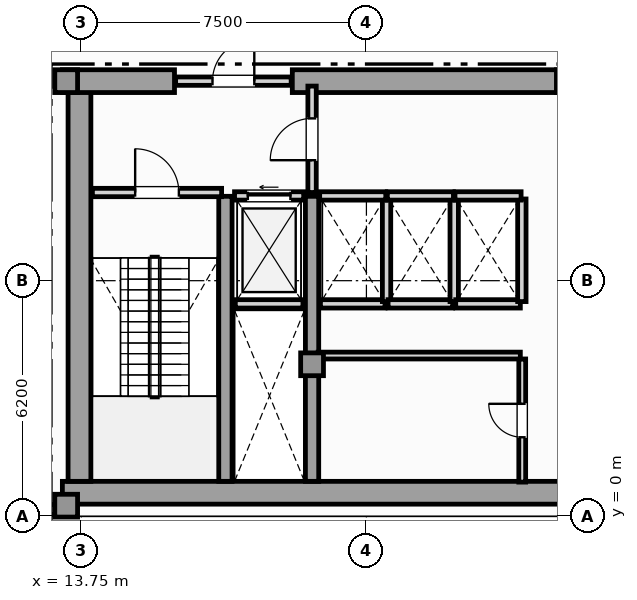
"""IFC4 building model, lengths in metres.
Left out: names, types, materials, properties, quantities, classifications, styles, units other than length and angle.
Written with IfcOpenShell. Run it as: python <this file> out.ifc"""

import sys

from ifc_helpers import new_model, si_unit, direction, frame, frame_2d, origin, origin_2d, place, context, subcontext, project, spatial, rectangle, extrude, element, fill, save


model = new_model("IFC4")
c1 = context("Model", 3, precision=1e-05, world=origin(), true_north=direction((0.0, 1.0)))
c2 = subcontext(c1, "Body", "Model", "MODEL_VIEW")
j1 = project(units=[si_unit("LENGTHUNIT", "METRE"), si_unit("PLANEANGLEUNIT", "RADIAN")], contexts=[c1])
p1 = place(None, origin())
s1 = spatial("IfcSite", under=j1, at=p1, CompositionType="ELEMENT")
p2 = place(p1, origin())
s2 = spatial("IfcBuilding", under=s1, at=p2, CompositionType="ELEMENT")
p3 = place(p2, frame((0.0, 0.0, 246.5)))
s3 = spatial("IfcBuildingStorey", under=s2, at=p3, CompositionType="ELEMENT", Elevation=246.5)
p4 = place(p3, frame((13.25, 0.62, 0.0), z_axis=(0.0, 0.0, 1.0), x_axis=(1.0, 0.0, 0.0)))
e1 = element("IfcWall", 1, at=p4, inside=s3, PredefinedType="SHEAR", context=c2, shape_type="SweptSolid", body=[
    extrude(rectangle(XDim=31.0, YDim=0.6, at=frame_2d((15.5, 0.0))), origin(), (0.0, 0.0, 1.0), 4.92),
])
p5 = place(p3, frame((13.7, 0.92, 0.0), z_axis=(0.0, 0.0, 1.0), x_axis=(0.0, 1.0, 0.0)))
e2 = element("IfcWall", 2, at=p5, inside=s3, PredefinedType="SHEAR", context=c2, shape_type="SweptSolid", body=[
    extrude(rectangle(XDim=10.53, YDim=0.6, at=frame_2d((5.265, 0.0))), origin(), (0.0, 0.0, 1.0), 4.92),
])
p6 = place(p3, frame((13.25, 11.45, 0.0), z_axis=(0.0, 0.0, 1.0), x_axis=(1.0, 0.0, 0.0)))
e3 = element("IfcWall", 3, at=p6, inside=s3, PredefinedType="SHEAR", context=c2, shape_type="SweptSolid", body=[
    extrude(rectangle(XDim=2.95, YDim=0.6, at=frame_2d((1.475, 0.0))), origin(), (0.0, 0.0, 1.0), 4.92),
])
p7 = place(p3, frame((19.3, 11.45, 0.0), z_axis=(0.0, 0.0, 1.0), x_axis=(1.0, 0.0, 0.0)))
e4 = element("IfcWall", 4, at=p7, inside=s3, PredefinedType="SHEAR", context=c2, shape_type="SweptSolid", body=[
    extrude(rectangle(XDim=7.3, YDim=0.6, at=frame_2d((3.65, 0.0))), origin(), (0.0, 0.0, 1.0), 4.92),
])
for number, where, z_axis, x_axis in (
    (5, (17.54, 0.92, 0.0), (0.0, 0.0, 1.0), (0.0, 1.0, 0.0)),
    (6, (19.82, 0.92, 0.0), (0.0, 0.0, 1.0), (0.0, 1.0, 0.0)),
):
    element("IfcWall", number, at=place(p3, frame(where, z_axis=z_axis, x_axis=x_axis)), inside=s3, PredefinedType="SHEAR", context=c2, shape_type="SweptSolid", body=[
        extrude(rectangle(XDim=7.5, YDim=0.35, at=frame_2d((3.75, 0.0))), origin(), (0.0, 0.0, 1.0), 4.92),
    ])
for number, where, z_axis, x_axis in (
    (7, (13.35, 0.28, 0.0), (0.0, 0.0, 1.0), (1.0, 0.0, 0.0)),
    (8, (13.35, 11.45, 0.0), (0.0, 0.0, 1.0), (1.0, 0.0, 0.0)),
    (9, (19.82, 4.0, 0.0), (0.0, 0.0, 1.0), (1.0, 0.0, 0.0)),
    (10, (26.55, 11.45, 0.0), (0.0, 0.0, 1.0), (1.0, 0.0, 0.0)),
):
    element("IfcColumn", number, at=place(p3, frame(where, z_axis=z_axis, x_axis=x_axis)), inside=s3, PredefinedType="COLUMN", context=c2, shape_type="SweptSolid", body=[
        extrude(rectangle(XDim=0.6, YDim=0.6, at=origin_2d()), origin(), (0.0, 0.0, 1.0), 5.2),
    ])
p8 = place(p3, frame((11.024, 0.18, 0.0), z_axis=(0.0, 0.0, 1.0), x_axis=(1.0, 0.0, 0.0)))
e11 = element("IfcWall", 11, at=p8, inside=s3, PredefinedType="SOLIDWALL", context=c2, shape_type="SweptSolid", body=[
    extrude(rectangle(XDim=2.226, YDim=0.26, at=frame_2d((1.113, 0.0))), origin(), (0.0, 0.0, 1.0), 4.92),
])
p9 = place(p3, frame((17.8, 5.59, 0.0), z_axis=(0.0, 0.0, 1.0), x_axis=(1.0, 0.0, 0.0)))
e12 = element("IfcWall", 12, at=p9, inside=s3, PredefinedType="SOLIDWALL", context=c2, shape_type="SweptSolid", body=[
    extrude(rectangle(XDim=1.78, YDim=0.22, at=frame_2d((0.89, 0.0))), origin(), (0.0, 0.0, 1.0), 4.92),
])
p10 = place(p3, frame((17.78, 8.43, 0.0), z_axis=(0.0, 0.0, 1.0), x_axis=(1.0, 0.0, 0.0)))
e13 = element("IfcWall", 13, at=p10, inside=s3, PredefinedType="SOLIDWALL", context=c2, shape_type="SweptSolid", body=[
    extrude(rectangle(XDim=1.82, YDim=0.22, at=frame_2d((0.91, 0.0))), origin(), (0.0, 0.0, 1.0), 4.92),
])
p11 = place(p10, frame((0.35, 0.0, 0.0)))
e14 = element("IfcOpeningElement", 14, at=p11, cuts=e13, PredefinedType="OPENING", context=c2, shape_type="SweptSolid", body=[
    extrude(rectangle(XDim=1.12, YDim=2.25, at=frame_2d((0.56, 1.125))), frame((0.0, 0.12, 0.0), z_axis=(0.0, -1.0, 0.0), x_axis=(1.0, 0.0, 0.0)), (0.0, 0.0, 1.0), 0.24),
])
p12 = place(p3, frame((20.04, 5.59, 0.0), z_axis=(0.0, 0.0, 1.0), x_axis=(1.0, 0.0, 0.0)))
e15 = element("IfcWall", 15, at=p12, inside=s3, PredefinedType="SOLIDWALL", context=c2, shape_type="SweptSolid", body=[
    extrude(rectangle(XDim=1.7, YDim=0.22, at=frame_2d((0.85, 0.0))), origin(), (0.0, 0.0, 1.0), 4.92),
])
p13 = place(p3, frame((21.78, 5.65, 0.0), z_axis=(0.0, 0.0, 1.0), x_axis=(0.0, 1.0, 0.0)))
e16 = element("IfcWall", 16, at=p13, inside=s3, PredefinedType="SOLIDWALL", context=c2, shape_type="SweptSolid", body=[
    extrude(rectangle(XDim=2.7, YDim=0.22, at=frame_2d((1.35, 0.0))), origin(), (0.0, 0.0, 1.0), 4.92),
])
p14 = place(p3, frame((20.02, 8.43, 0.0), z_axis=(0.0, 0.0, 1.0), x_axis=(1.0, 0.0, 0.0)))
e17 = element("IfcWall", 17, at=p14, inside=s3, PredefinedType="SOLIDWALL", context=c2, shape_type="SweptSolid", body=[
    extrude(rectangle(XDim=1.74, YDim=0.22, at=frame_2d((0.87, 0.0))), origin(), (0.0, 0.0, 1.0), 4.92),
])
p15 = place(p3, frame((21.82, 5.59, 0.0), z_axis=(0.0, 0.0, 1.0), x_axis=(1.0, 0.0, 0.0)))
e18 = element("IfcWall", 18, at=p15, inside=s3, PredefinedType="SOLIDWALL", context=c2, shape_type="SweptSolid", body=[
    extrude(rectangle(XDim=1.7, YDim=0.22, at=frame_2d((0.85, 0.0))), origin(), (0.0, 0.0, 1.0), 4.92),
])
p16 = place(p3, frame((23.56, 5.65, 0.0), z_axis=(0.0, 0.0, 1.0), x_axis=(0.0, 1.0, 0.0)))
e19 = element("IfcWall", 19, at=p16, inside=s3, PredefinedType="SOLIDWALL", context=c2, shape_type="SweptSolid", body=[
    extrude(rectangle(XDim=2.7, YDim=0.22, at=frame_2d((1.35, 0.0))), origin(), (0.0, 0.0, 1.0), 4.92),
])
p17 = place(p3, frame((21.8, 8.43, 0.0), z_axis=(0.0, 0.0, 1.0), x_axis=(1.0, 0.0, 0.0)))
e20 = element("IfcWall", 20, at=p17, inside=s3, PredefinedType="SOLIDWALL", context=c2, shape_type="SweptSolid", body=[
    extrude(rectangle(XDim=1.74, YDim=0.22, at=frame_2d((0.87, 0.0))), origin(), (0.0, 0.0, 1.0), 4.92),
])
p18 = place(p3, frame((23.6, 5.59, 0.0), z_axis=(0.0, 0.0, 1.0), x_axis=(1.0, 0.0, 0.0)))
e21 = element("IfcWall", 21, at=p18, inside=s3, PredefinedType="SOLIDWALL", context=c2, shape_type="SweptSolid", body=[
    extrude(rectangle(XDim=1.7, YDim=0.22, at=frame_2d((0.85, 0.0))), origin(), (0.0, 0.0, 1.0), 4.92),
])
p19 = place(p3, frame((25.34, 5.65, 0.0), z_axis=(0.0, 0.0, 1.0), x_axis=(0.0, 1.0, 0.0)))
e22 = element("IfcWall", 22, at=p19, inside=s3, PredefinedType="SOLIDWALL", context=c2, shape_type="SweptSolid", body=[
    extrude(rectangle(XDim=2.7, YDim=0.22, at=frame_2d((1.35, 0.0))), origin(), (0.0, 0.0, 1.0), 4.92),
])
p20 = place(p3, frame((23.58, 8.43, 0.0), z_axis=(0.0, 0.0, 1.0), x_axis=(1.0, 0.0, 0.0)))
e23 = element("IfcWall", 23, at=p20, inside=s3, PredefinedType="SOLIDWALL", context=c2, shape_type="SweptSolid", body=[
    extrude(rectangle(XDim=1.74, YDim=0.22, at=frame_2d((0.87, 0.0))), origin(), (0.0, 0.0, 1.0), 4.92),
])
p21 = place(p3, frame((14.04, 8.52, 0.0), z_axis=(0.0, 0.0, 1.0), x_axis=(1.0, 0.0, 0.0)))
e24 = element("IfcWall", 24, at=p21, inside=s3, PredefinedType="SOLIDWALL", context=c2, shape_type="SweptSolid", body=[
    extrude(rectangle(XDim=3.4, YDim=0.22, at=frame_2d((1.7, 0.0))), origin(), (0.0, 0.0, 1.0), 4.92),
])
p22 = place(p21, frame((1.125, 0.0, 0.0)))
e25 = element("IfcOpeningElement", 25, at=p22, cuts=e24, PredefinedType="OPENING", context=c2, shape_type="SweptSolid", body=[
    extrude(rectangle(XDim=1.15, YDim=2.2, at=frame_2d((0.575, 1.1))), frame((0.0, 0.12, 0.0), z_axis=(0.0, -1.0, 0.0), x_axis=(1.0, 0.0, 0.0)), (0.0, 0.0, 1.0), 0.24),
])
p23 = place(p3, frame((19.82, 8.52, 0.0), z_axis=(0.0, 0.0, 1.0), x_axis=(0.0, 1.0, 0.0)))
e26 = element("IfcWall", 26, at=p23, inside=s3, PredefinedType="SOLIDWALL", context=c2, shape_type="SweptSolid", body=[
    extrude(rectangle(XDim=2.8, YDim=0.22, at=frame_2d((1.4, 0.0))), origin(), (0.0, 0.0, 1.0), 4.375),
])
p24 = place(p23, frame((0.85, 0.0, 0.0)))
e27 = element("IfcOpeningElement", 27, at=p24, cuts=e26, PredefinedType="OPENING", context=c2, shape_type="SweptSolid", body=[
    extrude(rectangle(XDim=1.1, YDim=2.2, at=frame_2d((0.55, 1.1))), frame((0.0, 0.12, 0.0), z_axis=(0.0, -1.0, 0.0), x_axis=(1.0, 0.0, 0.0)), (0.0, 0.0, 1.0), 0.24),
])
p25 = place(p3, frame((16.23, 11.45, 0.0), z_axis=(0.0, 0.0, 1.0), x_axis=(1.0, 0.0, 0.0)))
e28 = element("IfcWall", 28, at=p25, inside=s3, PredefinedType="SOLIDWALL", context=c2, shape_type="SweptSolid", body=[
    extrude(rectangle(XDim=3.04, YDim=0.22, at=frame_2d((1.52, 0.0))), origin(), (0.0, 0.0, 1.0), 4.92),
])
p26 = place(p25, frame((0.97, 0.0, 0.0)))
e29 = element("IfcOpeningElement", 29, at=p26, cuts=e28, PredefinedType="OPENING", context=c2, shape_type="SweptSolid", body=[
    extrude(rectangle(XDim=1.1, YDim=2.2, at=frame_2d((0.55, 1.1))), frame((0.0, 0.12, 0.0), z_axis=(0.0, -1.0, 0.0), x_axis=(1.0, 0.0, 0.0)), (0.0, 0.0, 1.0), 0.24),
])
p27 = place(p3, frame((25.35, 0.9, 0.0), z_axis=(0.0, 0.0, 1.0), x_axis=(0.0, 1.0, 0.0)))
e30 = element("IfcWall", 30, at=p27, inside=s3, PredefinedType="PARTITIONING", context=c2, shape_type="SweptSolid", body=[
    extrude(rectangle(XDim=3.24, YDim=0.18, at=frame_2d((1.62, 0.0))), origin(), (0.0, 0.0, 1.0), 4.92),
])
p28 = place(p27, frame((1.18, 0.0, 0.0)))
e31 = element("IfcOpeningElement", 31, at=p28, cuts=e30, PredefinedType="OPENING", context=c2, shape_type="SweptSolid", body=[
    extrude(rectangle(XDim=0.88, YDim=2.05, at=frame_2d((0.44, 1.025))), frame((0.0, 0.1, 0.0), z_axis=(0.0, -1.0, 0.0), x_axis=(1.0, 0.0, 0.0)), (0.0, 0.0, 1.0), 0.2),
])
p29 = place(p3, frame((19.98, 4.23, 0.0), z_axis=(0.0, 0.0, 1.0), x_axis=(1.0, 0.0, 0.0)))
e32 = element("IfcWall", 32, at=p29, inside=s3, PredefinedType="PARTITIONING", context=c2, shape_type="SweptSolid", body=[
    extrude(rectangle(XDim=5.32, YDim=0.18, at=frame_2d((2.66, 0.0))), origin(), (0.0, 0.0, 1.0), 4.92),
])
p30 = place(p11, origin())
e33 = element("IfcDoor", 33, at=p30, inside=s3, OperationType="SLIDING_TO_LEFT", PredefinedType="DOOR", context=c2, shape_type="SweptSolid", body=[
    extrude(rectangle(XDim=1.12, YDim=2.25, at=frame_2d((0.56, 1.125))), frame((0.0, 0.025, 0.0), z_axis=(0.0, -1.0, 0.0), x_axis=(1.0, 0.0, 0.0)), (0.0, 0.0, 1.0), 0.05),
])
fill(e14, e33)
p31 = place(p22, origin())
e34 = element("IfcDoor", 34, at=p31, inside=s3, OperationType="SINGLE_SWING_LEFT", PredefinedType="DOOR", context=c2, shape_type="SweptSolid", body=[
    extrude(rectangle(XDim=1.15, YDim=2.2, at=frame_2d((0.575, 1.1))), frame((0.0, 0.025, 0.0), z_axis=(0.0, -1.0, 0.0), x_axis=(1.0, 0.0, 0.0)), (0.0, 0.0, 1.0), 0.05),
])
fill(e25, e34)
p32 = place(p24, origin())
e35 = element("IfcDoor", 35, at=p32, inside=s3, OperationType="SINGLE_SWING_LEFT", PredefinedType="DOOR", context=c2, shape_type="SweptSolid", body=[
    extrude(rectangle(XDim=1.1, YDim=2.2, at=frame_2d((0.55, 1.1))), frame((0.0, 0.025, 0.0), z_axis=(0.0, -1.0, 0.0), x_axis=(1.0, 0.0, 0.0)), (0.0, 0.0, 1.0), 0.05),
])
fill(e27, e35)
p33 = place(p26, origin())
e36 = element("IfcDoor", 36, at=p33, inside=s3, OperationType="SINGLE_SWING_RIGHT", PredefinedType="DOOR", context=c2, shape_type="SweptSolid", body=[
    extrude(rectangle(XDim=1.1, YDim=2.2, at=frame_2d((0.55, 1.1))), frame((0.0, 0.025, 0.0), z_axis=(0.0, -1.0, 0.0), x_axis=(1.0, 0.0, 0.0)), (0.0, 0.0, 1.0), 0.05),
])
fill(e29, e36)
p34 = place(p28, origin())
e37 = element("IfcDoor", 37, at=p34, inside=s3, OperationType="SINGLE_SWING_RIGHT", PredefinedType="DOOR", context=c2, shape_type="SweptSolid", body=[
    extrude(rectangle(XDim=0.88, YDim=2.05, at=frame_2d((0.44, 1.025))), frame((0.0, 0.025, 0.0), z_axis=(0.0, -1.0, 0.0), x_axis=(1.0, 0.0, 0.0)), (0.0, 0.0, 1.0), 0.05),
])
fill(e31, e37)
save(model, sys.argv[1])
